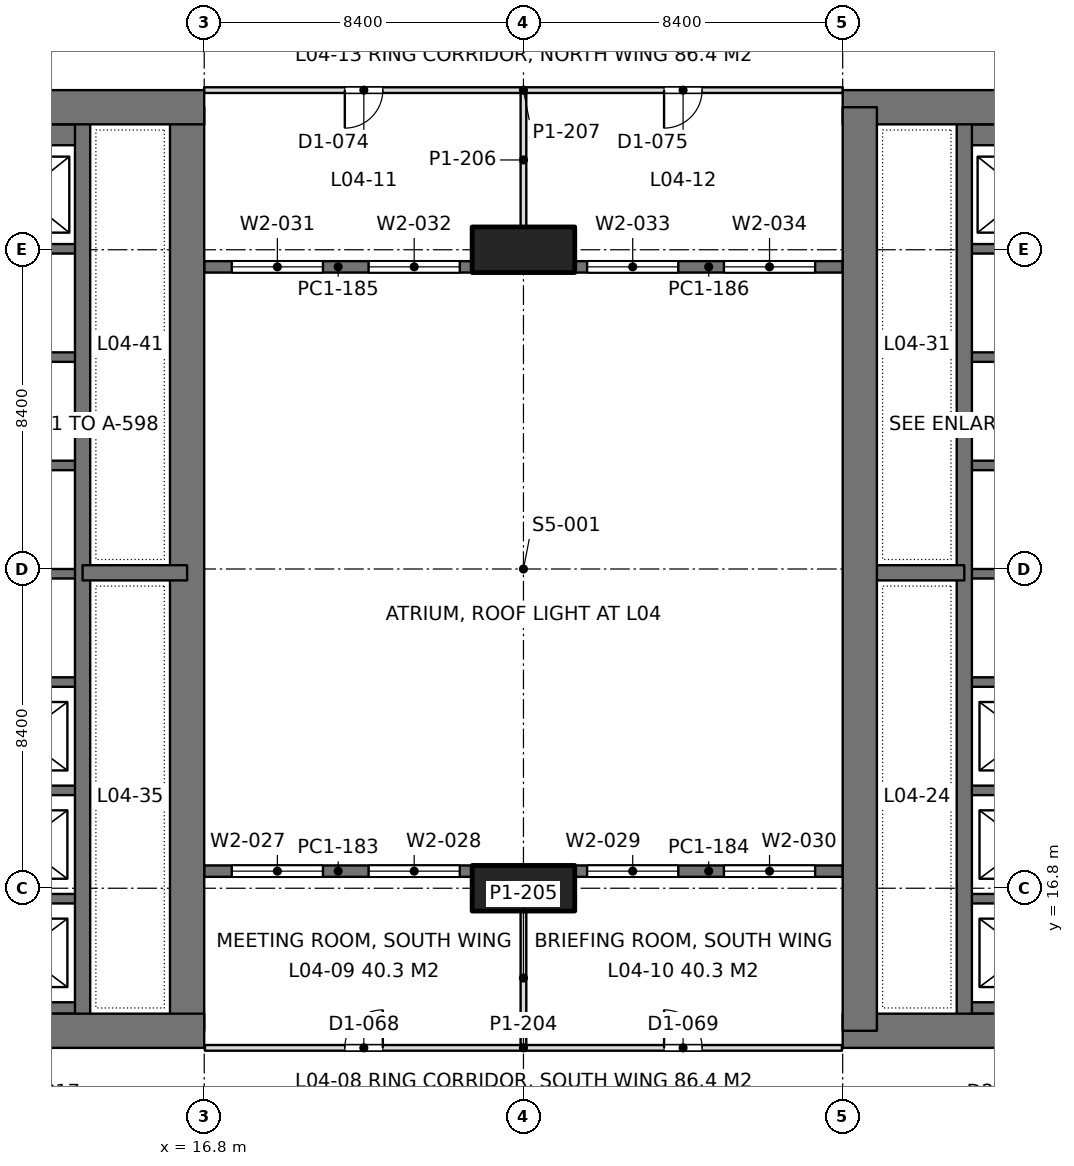
"""IFC4 building model, lengths in metres.
Left out: names, types, materials, properties, quantities, classifications, styles, units other than length and angle.
Written with IfcOpenShell. Run it as: python <this file> out.ifc"""

import sys

from ifc_helpers import new_model, si_unit, direction, frame, frame_2d, origin, origin_2d, place, context, subcontext, project, spatial, rectangle, extrude, element, fill, save


model = new_model("IFC4")
c1 = context("Model", 3, precision=1e-05, world=origin(), true_north=direction((0.0, 1.0)))
c2 = subcontext(c1, "Body", "Model", "MODEL_VIEW")
j1 = project(units=[si_unit("LENGTHUNIT", "METRE"), si_unit("PLANEANGLEUNIT", "RADIAN")], contexts=[c1])
p1 = place(None, origin())
s1 = spatial("IfcSite", under=j1, at=p1, CompositionType="ELEMENT")
p2 = place(p1, origin())
s2 = spatial("IfcBuilding", under=s1, at=p2, CompositionType="ELEMENT")
p3 = place(p2, frame((0.0, 0.0, 18.9)))
s3 = spatial("IfcBuildingStorey", under=s2, at=p3, CompositionType="ELEMENT", Elevation=18.9)
for number, where, z_axis, x_axis in (
    (1, (25.2, 16.8, 0.0), (0.0, 0.0, 1.0), (1.0, 0.0, 0.0)),
    (2, (25.2, 33.6, 0.0), (0.0, 0.0, 1.0), (1.0, 0.0, 0.0)),
):
    element("IfcColumn", number, at=place(p3, frame(where, z_axis=z_axis, x_axis=x_axis)), inside=s3, PredefinedType="COLUMN", context=c2, shape_type="SweptSolid", body=[
        extrude(rectangle(XDim=2.7, YDim=1.2, at=origin_2d()), origin(), (0.0, 0.0, 1.0), 4.5),
    ])
p4 = place(p3, frame((-1.2, 13.05, 0.0), z_axis=(0.0, 0.0, 1.0), x_axis=(1.0, 0.0, 0.0)))
e3 = element("IfcWall", 3, at=p4, inside=s3, PredefinedType="SHEAR", context=c2, shape_type="SweptSolid", body=[
    extrude(rectangle(XDim=18.0, YDim=0.9, at=frame_2d((9.0, 0.0))), origin(), (0.0, 0.0, 1.0), 4.5),
])
p5 = place(p4, frame((8.95, 0.0, 0.0)))
e4 = element("IfcOpeningElement", 4, at=p5, cuts=e3, PredefinedType="OPENING", context=c2, shape_type="SweptSolid", body=[
    extrude(rectangle(XDim=1.8, YDim=2.4, at=frame_2d((0.9, 1.2))), frame((0.0, 0.46, 0.0), z_axis=(0.0, -1.0, 0.0), x_axis=(1.0, 0.0, 0.0)), (0.0, 0.0, 1.0), 0.92),
])
p6 = place(p3, frame((-1.2, 37.35, 0.0), z_axis=(0.0, 0.0, 1.0), x_axis=(1.0, 0.0, 0.0)))
e5 = element("IfcWall", 5, at=p6, inside=s3, PredefinedType="SHEAR", context=c2, shape_type="SweptSolid", body=[
    extrude(rectangle(XDim=18.0, YDim=0.9, at=frame_2d((9.0, 0.0))), origin(), (0.0, 0.0, 1.0), 4.5),
])
p7 = place(p6, frame((8.95, 0.0, 0.0)))
e6 = element("IfcOpeningElement", 6, at=p7, cuts=e5, PredefinedType="OPENING", context=c2, shape_type="SweptSolid", body=[
    extrude(rectangle(XDim=1.8, YDim=2.4, at=frame_2d((0.9, 1.2))), frame((0.0, 0.46, 0.0), z_axis=(0.0, -1.0, 0.0), x_axis=(1.0, 0.0, 0.0)), (0.0, 0.0, 1.0), 0.92),
])
p8 = place(p3, frame((16.35, 13.05, 0.0), z_axis=(0.0, 0.0, 1.0), x_axis=(0.0, 1.0, 0.0)))
e7 = element("IfcWall", 7, at=p8, inside=s3, PredefinedType="SHEAR", context=c2, shape_type="SweptSolid", body=[
    extrude(rectangle(XDim=24.3, YDim=0.9, at=frame_2d((12.15, 0.0))), origin(), (0.0, 0.0, 1.0), 4.5),
])
p9 = place(p3, frame((13.6, 13.05, 0.0), z_axis=(0.0, 0.0, 1.0), x_axis=(0.0, 1.0, 0.0)))
e8 = element("IfcWall", 8, at=p9, inside=s3, PredefinedType="SHEAR", context=c2, shape_type="SweptSolid", body=[
    extrude(rectangle(XDim=24.3, YDim=0.4, at=frame_2d((12.15, 0.0))), origin(), (0.0, 0.0, 1.0), 4.5),
])
p10 = place(p3, frame((13.6, 25.1, 0.0), z_axis=(0.0, 0.0, 1.0), x_axis=(1.0, 0.0, 0.0)))
e9 = element("IfcWall", 9, at=p10, inside=s3, PredefinedType="SHEAR", context=c2, shape_type="SweptSolid", body=[
    extrude(rectangle(XDim=2.75, YDim=0.4, at=frame_2d((1.375, 0.0))), origin(), (0.0, 0.0, 1.0), 4.5),
])
p11 = place(p3, frame((10.4, 13.65, 0.0), z_axis=(0.0, 0.0, 1.0), x_axis=(1.0, 0.0, 0.0)))
e10 = element("IfcWall", 10, at=p11, inside=s3, PredefinedType="SHEAR", context=c2, shape_type="SweptSolid", body=[
    extrude(rectangle(XDim=3.2, YDim=0.3, at=frame_2d((1.6, 0.0))), origin(), (0.0, 0.0, 1.0), 4.5),
])
for number, where, z_axis, x_axis in (
    (11, (10.4, 16.525, 0.0), (0.0, 0.0, 1.0), (1.0, 0.0, 0.0)),
    (12, (10.4, 19.375, 0.0), (0.0, 0.0, 1.0), (1.0, 0.0, 0.0)),
    (13, (10.4, 22.225, 0.0), (0.0, 0.0, 1.0), (1.0, 0.0, 0.0)),
    (14, (10.4, 25.075, 0.0), (0.0, 0.0, 1.0), (1.0, 0.0, 0.0)),
    (15, (10.4, 27.925, 0.0), (0.0, 0.0, 1.0), (1.0, 0.0, 0.0)),
    (16, (10.4, 30.775, 0.0), (0.0, 0.0, 1.0), (1.0, 0.0, 0.0)),
    (17, (10.4, 33.625, 0.0), (0.0, 0.0, 1.0), (1.0, 0.0, 0.0)),
):
    element("IfcWall", number, at=place(p3, frame(where, z_axis=z_axis, x_axis=x_axis)), inside=s3, PredefinedType="SHEAR", context=c2, shape_type="SweptSolid", body=[
        extrude(rectangle(XDim=3.2, YDim=0.25, at=frame_2d((1.6, 0.0))), origin(), (0.0, 0.0, 1.0), 4.5),
    ])
p12 = place(p3, frame((10.4, 36.625, 0.0), z_axis=(0.0, 0.0, 1.0), x_axis=(1.0, 0.0, 0.0)))
e18 = element("IfcWall", 18, at=p12, inside=s3, PredefinedType="SHEAR", context=c2, shape_type="SweptSolid", body=[
    extrude(rectangle(XDim=3.2, YDim=0.55, at=frame_2d((1.6, 0.0))), origin(), (0.0, 0.0, 1.0), 4.5),
])
p13 = place(p3, frame((33.6, 13.05, 0.0), z_axis=(0.0, 0.0, 1.0), x_axis=(1.0, 0.0, 0.0)))
e19 = element("IfcWall", 19, at=p13, inside=s3, PredefinedType="SHEAR", context=c2, shape_type="SweptSolid", body=[
    extrude(rectangle(XDim=18.0, YDim=0.9, at=frame_2d((9.0, 0.0))), origin(), (0.0, 0.0, 1.0), 4.5),
])
p14 = place(p13, frame((7.25, 0.0, 0.0)))
e20 = element("IfcOpeningElement", 20, at=p14, cuts=e19, PredefinedType="OPENING", context=c2, shape_type="SweptSolid", body=[
    extrude(rectangle(XDim=1.8, YDim=2.4, at=frame_2d((0.9, 1.2))), frame((0.0, 0.46, 0.0), z_axis=(0.0, -1.0, 0.0), x_axis=(1.0, 0.0, 0.0)), (0.0, 0.0, 1.0), 0.92),
])
p15 = place(p3, frame((33.6, 37.35, 0.0), z_axis=(0.0, 0.0, 1.0), x_axis=(1.0, 0.0, 0.0)))
e21 = element("IfcWall", 21, at=p15, inside=s3, PredefinedType="SHEAR", context=c2, shape_type="SweptSolid", body=[
    extrude(rectangle(XDim=18.0, YDim=0.9, at=frame_2d((9.0, 0.0))), origin(), (0.0, 0.0, 1.0), 4.5),
])
p16 = place(p15, frame((7.25, 0.0, 0.0)))
e22 = element("IfcOpeningElement", 22, at=p16, cuts=e21, PredefinedType="OPENING", context=c2, shape_type="SweptSolid", body=[
    extrude(rectangle(XDim=1.8, YDim=2.4, at=frame_2d((0.9, 1.2))), frame((0.0, 0.46, 0.0), z_axis=(0.0, -1.0, 0.0), x_axis=(1.0, 0.0, 0.0)), (0.0, 0.0, 1.0), 0.92),
])
p17 = place(p3, frame((34.05, 13.05, 0.0), z_axis=(0.0, 0.0, 1.0), x_axis=(0.0, 1.0, 0.0)))
e23 = element("IfcWall", 23, at=p17, inside=s3, PredefinedType="SHEAR", context=c2, shape_type="SweptSolid", body=[
    extrude(rectangle(XDim=24.3, YDim=0.9, at=frame_2d((12.15, 0.0))), origin(), (0.0, 0.0, 1.0), 4.5),
])
p18 = place(p3, frame((36.8, 13.05, 0.0), z_axis=(0.0, 0.0, 1.0), x_axis=(0.0, 1.0, 0.0)))
e24 = element("IfcWall", 24, at=p18, inside=s3, PredefinedType="SHEAR", context=c2, shape_type="SweptSolid", body=[
    extrude(rectangle(XDim=24.3, YDim=0.4, at=frame_2d((12.15, 0.0))), origin(), (0.0, 0.0, 1.0), 4.5),
])
p19 = place(p3, frame((36.8, 25.1, 0.0), z_axis=(0.0, 0.0, 1.0), x_axis=(-1.0, 0.0, 0.0)))
e25 = element("IfcWall", 25, at=p19, inside=s3, PredefinedType="SHEAR", context=c2, shape_type="SweptSolid", body=[
    extrude(rectangle(XDim=2.75, YDim=0.4, at=frame_2d((1.375, 0.0))), origin(), (0.0, 0.0, 1.0), 4.5),
])
p20 = place(p3, frame((40.0, 13.65, 0.0), z_axis=(0.0, 0.0, 1.0), x_axis=(-1.0, 0.0, 0.0)))
e26 = element("IfcWall", 26, at=p20, inside=s3, PredefinedType="SHEAR", context=c2, shape_type="SweptSolid", body=[
    extrude(rectangle(XDim=3.2, YDim=0.3, at=frame_2d((1.6, 0.0))), origin(), (0.0, 0.0, 1.0), 4.5),
])
for number, where, z_axis, x_axis in (
    (27, (40.0, 16.525, 0.0), (0.0, 0.0, 1.0), (-1.0, 0.0, 0.0)),
    (28, (40.0, 19.375, 0.0), (0.0, 0.0, 1.0), (-1.0, 0.0, 0.0)),
    (29, (40.0, 22.225, 0.0), (0.0, 0.0, 1.0), (-1.0, 0.0, 0.0)),
    (30, (40.0, 25.075, 0.0), (0.0, 0.0, 1.0), (-1.0, 0.0, 0.0)),
    (31, (40.0, 27.925, 0.0), (0.0, 0.0, 1.0), (-1.0, 0.0, 0.0)),
    (32, (40.0, 30.775, 0.0), (0.0, 0.0, 1.0), (-1.0, 0.0, 0.0)),
    (33, (40.0, 33.625, 0.0), (0.0, 0.0, 1.0), (-1.0, 0.0, 0.0)),
):
    element("IfcWall", number, at=place(p3, frame(where, z_axis=z_axis, x_axis=x_axis)), inside=s3, PredefinedType="SHEAR", context=c2, shape_type="SweptSolid", body=[
        extrude(rectangle(XDim=3.2, YDim=0.25, at=frame_2d((1.6, 0.0))), origin(), (0.0, 0.0, 1.0), 4.5),
    ])
p21 = place(p3, frame((40.0, 36.625, 0.0), z_axis=(0.0, 0.0, 1.0), x_axis=(-1.0, 0.0, 0.0)))
e34 = element("IfcWall", 34, at=p21, inside=s3, PredefinedType="SHEAR", context=c2, shape_type="SweptSolid", body=[
    extrude(rectangle(XDim=3.2, YDim=0.55, at=frame_2d((1.6, 0.0))), origin(), (0.0, 0.0, 1.0), 4.5),
])
p22 = place(p3, frame((16.8, 17.25, 0.0), z_axis=(0.0, 0.0, 1.0), x_axis=(1.0, 0.0, 0.0)))
e35 = element("IfcWall", 35, at=p22, inside=s3, PredefinedType="SOLIDWALL", context=c2, shape_type="SweptSolid", body=[
    extrude(rectangle(XDim=7.05, YDim=0.3, at=frame_2d((3.525, 0.0))), origin(), (0.0, 0.0, 1.0), 4.34),
])
p23 = place(p22, frame((0.725, 0.0, 0.9)))
e36 = element("IfcOpeningElement", 36, at=p23, cuts=e35, PredefinedType="OPENING", context=c2, shape_type="SweptSolid", body=[
    extrude(rectangle(XDim=2.4, YDim=1.9, at=frame_2d((1.2, 0.95))), frame((0.0, 0.16, 0.0), z_axis=(0.0, -1.0, 0.0), x_axis=(1.0, 0.0, 0.0)), (0.0, 0.0, 1.0), 0.32),
])
p24 = place(p22, frame((4.325, 0.0, 0.9)))
e37 = element("IfcOpeningElement", 37, at=p24, cuts=e35, PredefinedType="OPENING", context=c2, shape_type="SweptSolid", body=[
    extrude(rectangle(XDim=2.4, YDim=1.9, at=frame_2d((1.2, 0.95))), frame((0.0, 0.16, 0.0), z_axis=(0.0, -1.0, 0.0), x_axis=(1.0, 0.0, 0.0)), (0.0, 0.0, 1.0), 0.32),
])
p25 = place(p3, frame((26.55, 17.25, 0.0), z_axis=(0.0, 0.0, 1.0), x_axis=(1.0, 0.0, 0.0)))
e38 = element("IfcWall", 38, at=p25, inside=s3, PredefinedType="SOLIDWALL", context=c2, shape_type="SweptSolid", body=[
    extrude(rectangle(XDim=7.05, YDim=0.3, at=frame_2d((3.525, 0.0))), origin(), (0.0, 0.0, 1.0), 4.34),
])
p26 = place(p25, frame((0.325, 0.0, 0.9)))
e39 = element("IfcOpeningElement", 39, at=p26, cuts=e38, PredefinedType="OPENING", context=c2, shape_type="SweptSolid", body=[
    extrude(rectangle(XDim=2.4, YDim=1.9, at=frame_2d((1.2, 0.95))), frame((0.0, 0.16, 0.0), z_axis=(0.0, -1.0, 0.0), x_axis=(1.0, 0.0, 0.0)), (0.0, 0.0, 1.0), 0.32),
])
p27 = place(p25, frame((3.925, 0.0, 0.9)))
e40 = element("IfcOpeningElement", 40, at=p27, cuts=e38, PredefinedType="OPENING", context=c2, shape_type="SweptSolid", body=[
    extrude(rectangle(XDim=2.4, YDim=1.9, at=frame_2d((1.2, 0.95))), frame((0.0, 0.16, 0.0), z_axis=(0.0, -1.0, 0.0), x_axis=(1.0, 0.0, 0.0)), (0.0, 0.0, 1.0), 0.32),
])
p28 = place(p3, frame((16.8, 33.15, 0.0), z_axis=(0.0, 0.0, 1.0), x_axis=(1.0, 0.0, 0.0)))
e41 = element("IfcWall", 41, at=p28, inside=s3, PredefinedType="SOLIDWALL", context=c2, shape_type="SweptSolid", body=[
    extrude(rectangle(XDim=7.05, YDim=0.3, at=frame_2d((3.525, 0.0))), origin(), (0.0, 0.0, 1.0), 4.34),
])
p29 = place(p28, frame((0.725, 0.0, 0.9)))
e42 = element("IfcOpeningElement", 42, at=p29, cuts=e41, PredefinedType="OPENING", context=c2, shape_type="SweptSolid", body=[
    extrude(rectangle(XDim=2.4, YDim=1.9, at=frame_2d((1.2, 0.95))), frame((0.0, 0.16, 0.0), z_axis=(0.0, -1.0, 0.0), x_axis=(1.0, 0.0, 0.0)), (0.0, 0.0, 1.0), 0.32),
])
p30 = place(p28, frame((4.325, 0.0, 0.9)))
e43 = element("IfcOpeningElement", 43, at=p30, cuts=e41, PredefinedType="OPENING", context=c2, shape_type="SweptSolid", body=[
    extrude(rectangle(XDim=2.4, YDim=1.9, at=frame_2d((1.2, 0.95))), frame((0.0, 0.16, 0.0), z_axis=(0.0, -1.0, 0.0), x_axis=(1.0, 0.0, 0.0)), (0.0, 0.0, 1.0), 0.32),
])
p31 = place(p3, frame((26.55, 33.15, 0.0), z_axis=(0.0, 0.0, 1.0), x_axis=(1.0, 0.0, 0.0)))
e44 = element("IfcWall", 44, at=p31, inside=s3, PredefinedType="SOLIDWALL", context=c2, shape_type="SweptSolid", body=[
    extrude(rectangle(XDim=7.05, YDim=0.3, at=frame_2d((3.525, 0.0))), origin(), (0.0, 0.0, 1.0), 4.34),
])
p32 = place(p31, frame((0.325, 0.0, 0.9)))
e45 = element("IfcOpeningElement", 45, at=p32, cuts=e44, PredefinedType="OPENING", context=c2, shape_type="SweptSolid", body=[
    extrude(rectangle(XDim=2.4, YDim=1.9, at=frame_2d((1.2, 0.95))), frame((0.0, 0.16, 0.0), z_axis=(0.0, -1.0, 0.0), x_axis=(1.0, 0.0, 0.0)), (0.0, 0.0, 1.0), 0.32),
])
p33 = place(p31, frame((3.925, 0.0, 0.9)))
e46 = element("IfcOpeningElement", 46, at=p33, cuts=e44, PredefinedType="OPENING", context=c2, shape_type="SweptSolid", body=[
    extrude(rectangle(XDim=2.4, YDim=1.9, at=frame_2d((1.2, 0.95))), frame((0.0, 0.16, 0.0), z_axis=(0.0, -1.0, 0.0), x_axis=(1.0, 0.0, 0.0)), (0.0, 0.0, 1.0), 0.32),
])
p34 = place(p3, frame((25.2, 12.674, 0.0), z_axis=(0.0, 0.0, 1.0), x_axis=(0.0, 1.0, 0.0)))
e47 = element("IfcWall", 47, at=p34, inside=s3, PredefinedType="PARTITIONING", context=c2, shape_type="SweptSolid", body=[
    extrude(rectangle(XDim=3.527, YDim=0.15, at=frame_2d((1.763, 0.0))), origin(), (0.0, 0.0, 1.0), 3.74),
])
p35 = place(p3, frame((16.82, 12.6, 0.0), z_axis=(0.0, 0.0, 1.0), x_axis=(1.0, 0.0, 0.0)))
e48 = element("IfcWall", 48, at=p35, inside=s3, PredefinedType="PARTITIONING", context=c2, shape_type="SweptSolid", body=[
    extrude(rectangle(XDim=16.76, YDim=0.15, at=frame_2d((8.38, 0.0))), origin(), (0.0, 0.0, 1.0), 3.74),
])
p36 = place(p35, frame((3.68, 0.0, 0.0)))
e49 = element("IfcOpeningElement", 49, at=p36, cuts=e48, PredefinedType="OPENING", context=c2, shape_type="SweptSolid", body=[
    extrude(rectangle(XDim=1.0, YDim=2.2, at=frame_2d((0.5, 1.1))), frame((0.0, 0.085, 0.0), z_axis=(0.0, -1.0, 0.0), x_axis=(1.0, 0.0, 0.0)), (0.0, 0.0, 1.0), 0.17),
])
p37 = place(p35, frame((12.08, 0.0, 0.0)))
e50 = element("IfcOpeningElement", 50, at=p37, cuts=e48, PredefinedType="OPENING", context=c2, shape_type="SweptSolid", body=[
    extrude(rectangle(XDim=1.0, YDim=2.2, at=frame_2d((0.5, 1.1))), frame((0.0, 0.085, 0.0), z_axis=(0.0, -1.0, 0.0), x_axis=(1.0, 0.0, 0.0)), (0.0, 0.0, 1.0), 0.17),
])
p38 = place(p3, frame((25.2, 34.199, 0.0), z_axis=(0.0, 0.0, 1.0), x_axis=(0.0, 1.0, 0.0)))
e51 = element("IfcWall", 51, at=p38, inside=s3, PredefinedType="PARTITIONING", context=c2, shape_type="SweptSolid", body=[
    extrude(rectangle(XDim=3.527, YDim=0.15, at=frame_2d((1.764, 0.0))), origin(), (0.0, 0.0, 1.0), 3.74),
])
p39 = place(p3, frame((16.798, 37.8, 0.0), z_axis=(0.0, 0.0, 1.0), x_axis=(1.0, 0.0, 0.0)))
e52 = element("IfcWall", 52, at=p39, inside=s3, PredefinedType="PARTITIONING", context=c2, shape_type="SweptSolid", body=[
    extrude(rectangle(XDim=16.804, YDim=0.15, at=frame_2d((8.402, 0.0))), origin(), (0.0, 0.0, 1.0), 3.74),
])
p40 = place(p39, frame((3.702, 0.0, 0.0)))
e53 = element("IfcOpeningElement", 53, at=p40, cuts=e52, PredefinedType="OPENING", context=c2, shape_type="SweptSolid", body=[
    extrude(rectangle(XDim=1.0, YDim=2.2, at=frame_2d((0.5, 1.1))), frame((0.0, 0.085, 0.0), z_axis=(0.0, -1.0, 0.0), x_axis=(1.0, 0.0, 0.0)), (0.0, 0.0, 1.0), 0.17),
])
p41 = place(p39, frame((12.102, 0.0, 0.0)))
e54 = element("IfcOpeningElement", 54, at=p41, cuts=e52, PredefinedType="OPENING", context=c2, shape_type="SweptSolid", body=[
    extrude(rectangle(XDim=1.0, YDim=2.2, at=frame_2d((0.5, 1.1))), frame((0.0, 0.085, 0.0), z_axis=(0.0, -1.0, 0.0), x_axis=(1.0, 0.0, 0.0)), (0.0, 0.0, 1.0), 0.17),
])
p42 = place(p23, origin())
e55 = element("IfcWindow", 55, at=p42, inside=s3, PartitioningType="SINGLE_PANEL", PredefinedType="WINDOW", context=c2, shape_type="SweptSolid", body=[
    extrude(rectangle(XDim=2.4, YDim=1.9, at=frame_2d((1.2, 0.95))), frame((0.0, 0.03, 0.0), z_axis=(0.0, -1.0, 0.0), x_axis=(1.0, 0.0, 0.0)), (0.0, 0.0, 1.0), 0.06),
])
fill(e36, e55)
p43 = place(p24, origin())
e56 = element("IfcWindow", 56, at=p43, inside=s3, PartitioningType="SINGLE_PANEL", PredefinedType="WINDOW", context=c2, shape_type="SweptSolid", body=[
    extrude(rectangle(XDim=2.4, YDim=1.9, at=frame_2d((1.2, 0.95))), frame((0.0, 0.03, 0.0), z_axis=(0.0, -1.0, 0.0), x_axis=(1.0, 0.0, 0.0)), (0.0, 0.0, 1.0), 0.06),
])
fill(e37, e56)
p44 = place(p26, origin())
e57 = element("IfcWindow", 57, at=p44, inside=s3, PartitioningType="SINGLE_PANEL", PredefinedType="WINDOW", context=c2, shape_type="SweptSolid", body=[
    extrude(rectangle(XDim=2.4, YDim=1.9, at=frame_2d((1.2, 0.95))), frame((0.0, 0.03, 0.0), z_axis=(0.0, -1.0, 0.0), x_axis=(1.0, 0.0, 0.0)), (0.0, 0.0, 1.0), 0.06),
])
fill(e39, e57)
p45 = place(p27, origin())
e58 = element("IfcWindow", 58, at=p45, inside=s3, PartitioningType="SINGLE_PANEL", PredefinedType="WINDOW", context=c2, shape_type="SweptSolid", body=[
    extrude(rectangle(XDim=2.4, YDim=1.9, at=frame_2d((1.2, 0.95))), frame((0.0, 0.03, 0.0), z_axis=(0.0, -1.0, 0.0), x_axis=(1.0, 0.0, 0.0)), (0.0, 0.0, 1.0), 0.06),
])
fill(e40, e58)
p46 = place(p29, origin())
e59 = element("IfcWindow", 59, at=p46, inside=s3, PartitioningType="SINGLE_PANEL", PredefinedType="WINDOW", context=c2, shape_type="SweptSolid", body=[
    extrude(rectangle(XDim=2.4, YDim=1.9, at=frame_2d((1.2, 0.95))), frame((0.0, 0.03, 0.0), z_axis=(0.0, -1.0, 0.0), x_axis=(1.0, 0.0, 0.0)), (0.0, 0.0, 1.0), 0.06),
])
fill(e42, e59)
p47 = place(p30, origin())
e60 = element("IfcWindow", 60, at=p47, inside=s3, PartitioningType="SINGLE_PANEL", PredefinedType="WINDOW", context=c2, shape_type="SweptSolid", body=[
    extrude(rectangle(XDim=2.4, YDim=1.9, at=frame_2d((1.2, 0.95))), frame((0.0, 0.03, 0.0), z_axis=(0.0, -1.0, 0.0), x_axis=(1.0, 0.0, 0.0)), (0.0, 0.0, 1.0), 0.06),
])
fill(e43, e60)
p48 = place(p32, origin())
e61 = element("IfcWindow", 61, at=p48, inside=s3, PartitioningType="SINGLE_PANEL", PredefinedType="WINDOW", context=c2, shape_type="SweptSolid", body=[
    extrude(rectangle(XDim=2.4, YDim=1.9, at=frame_2d((1.2, 0.95))), frame((0.0, 0.03, 0.0), z_axis=(0.0, -1.0, 0.0), x_axis=(1.0, 0.0, 0.0)), (0.0, 0.0, 1.0), 0.06),
])
fill(e45, e61)
p49 = place(p33, origin())
e62 = element("IfcWindow", 62, at=p49, inside=s3, PartitioningType="SINGLE_PANEL", PredefinedType="WINDOW", context=c2, shape_type="SweptSolid", body=[
    extrude(rectangle(XDim=2.4, YDim=1.9, at=frame_2d((1.2, 0.95))), frame((0.0, 0.03, 0.0), z_axis=(0.0, -1.0, 0.0), x_axis=(1.0, 0.0, 0.0)), (0.0, 0.0, 1.0), 0.06),
])
fill(e46, e62)
p50 = place(p36, origin())
e63 = element("IfcDoor", 63, at=p50, inside=s3, OperationType="SINGLE_SWING_RIGHT", PredefinedType="DOOR", context=c2, shape_type="SweptSolid", body=[
    extrude(rectangle(XDim=1.0, YDim=2.2, at=frame_2d((0.5, 1.1))), frame((0.0, 0.025, 0.0), z_axis=(0.0, -1.0, 0.0), x_axis=(1.0, 0.0, 0.0)), (0.0, 0.0, 1.0), 0.05),
])
fill(e49, e63)
p51 = place(p37, origin())
e64 = element("IfcDoor", 64, at=p51, inside=s3, OperationType="SINGLE_SWING_LEFT", PredefinedType="DOOR", context=c2, shape_type="SweptSolid", body=[
    extrude(rectangle(XDim=1.0, YDim=2.2, at=frame_2d((0.5, 1.1))), frame((0.0, 0.025, 0.0), z_axis=(0.0, -1.0, 0.0), x_axis=(1.0, 0.0, 0.0)), (0.0, 0.0, 1.0), 0.05),
])
fill(e50, e64)
p52 = place(p40, frame((1.0, 0.0, 0.0), z_axis=(0.0, 0.0, 1.0), x_axis=(-1.0, 0.0, 0.0)))
e65 = element("IfcDoor", 65, at=p52, inside=s3, OperationType="SINGLE_SWING_RIGHT", PredefinedType="DOOR", context=c2, shape_type="SweptSolid", body=[
    extrude(rectangle(XDim=1.0, YDim=2.2, at=frame_2d((0.5, 1.1))), frame((0.0, 0.025, 0.0), z_axis=(0.0, -1.0, 0.0), x_axis=(1.0, 0.0, 0.0)), (0.0, 0.0, 1.0), 0.05),
])
fill(e53, e65)
p53 = place(p41, frame((1.0, 0.0, 0.0), z_axis=(0.0, 0.0, 1.0), x_axis=(-1.0, 0.0, 0.0)))
e66 = element("IfcDoor", 66, at=p53, inside=s3, OperationType="SINGLE_SWING_RIGHT", PredefinedType="DOOR", context=c2, shape_type="SweptSolid", body=[
    extrude(rectangle(XDim=1.0, YDim=2.2, at=frame_2d((0.5, 1.1))), frame((0.0, 0.025, 0.0), z_axis=(0.0, -1.0, 0.0), x_axis=(1.0, 0.0, 0.0)), (0.0, 0.0, 1.0), 0.05),
])
fill(e54, e66)
save(model, sys.argv[1])
